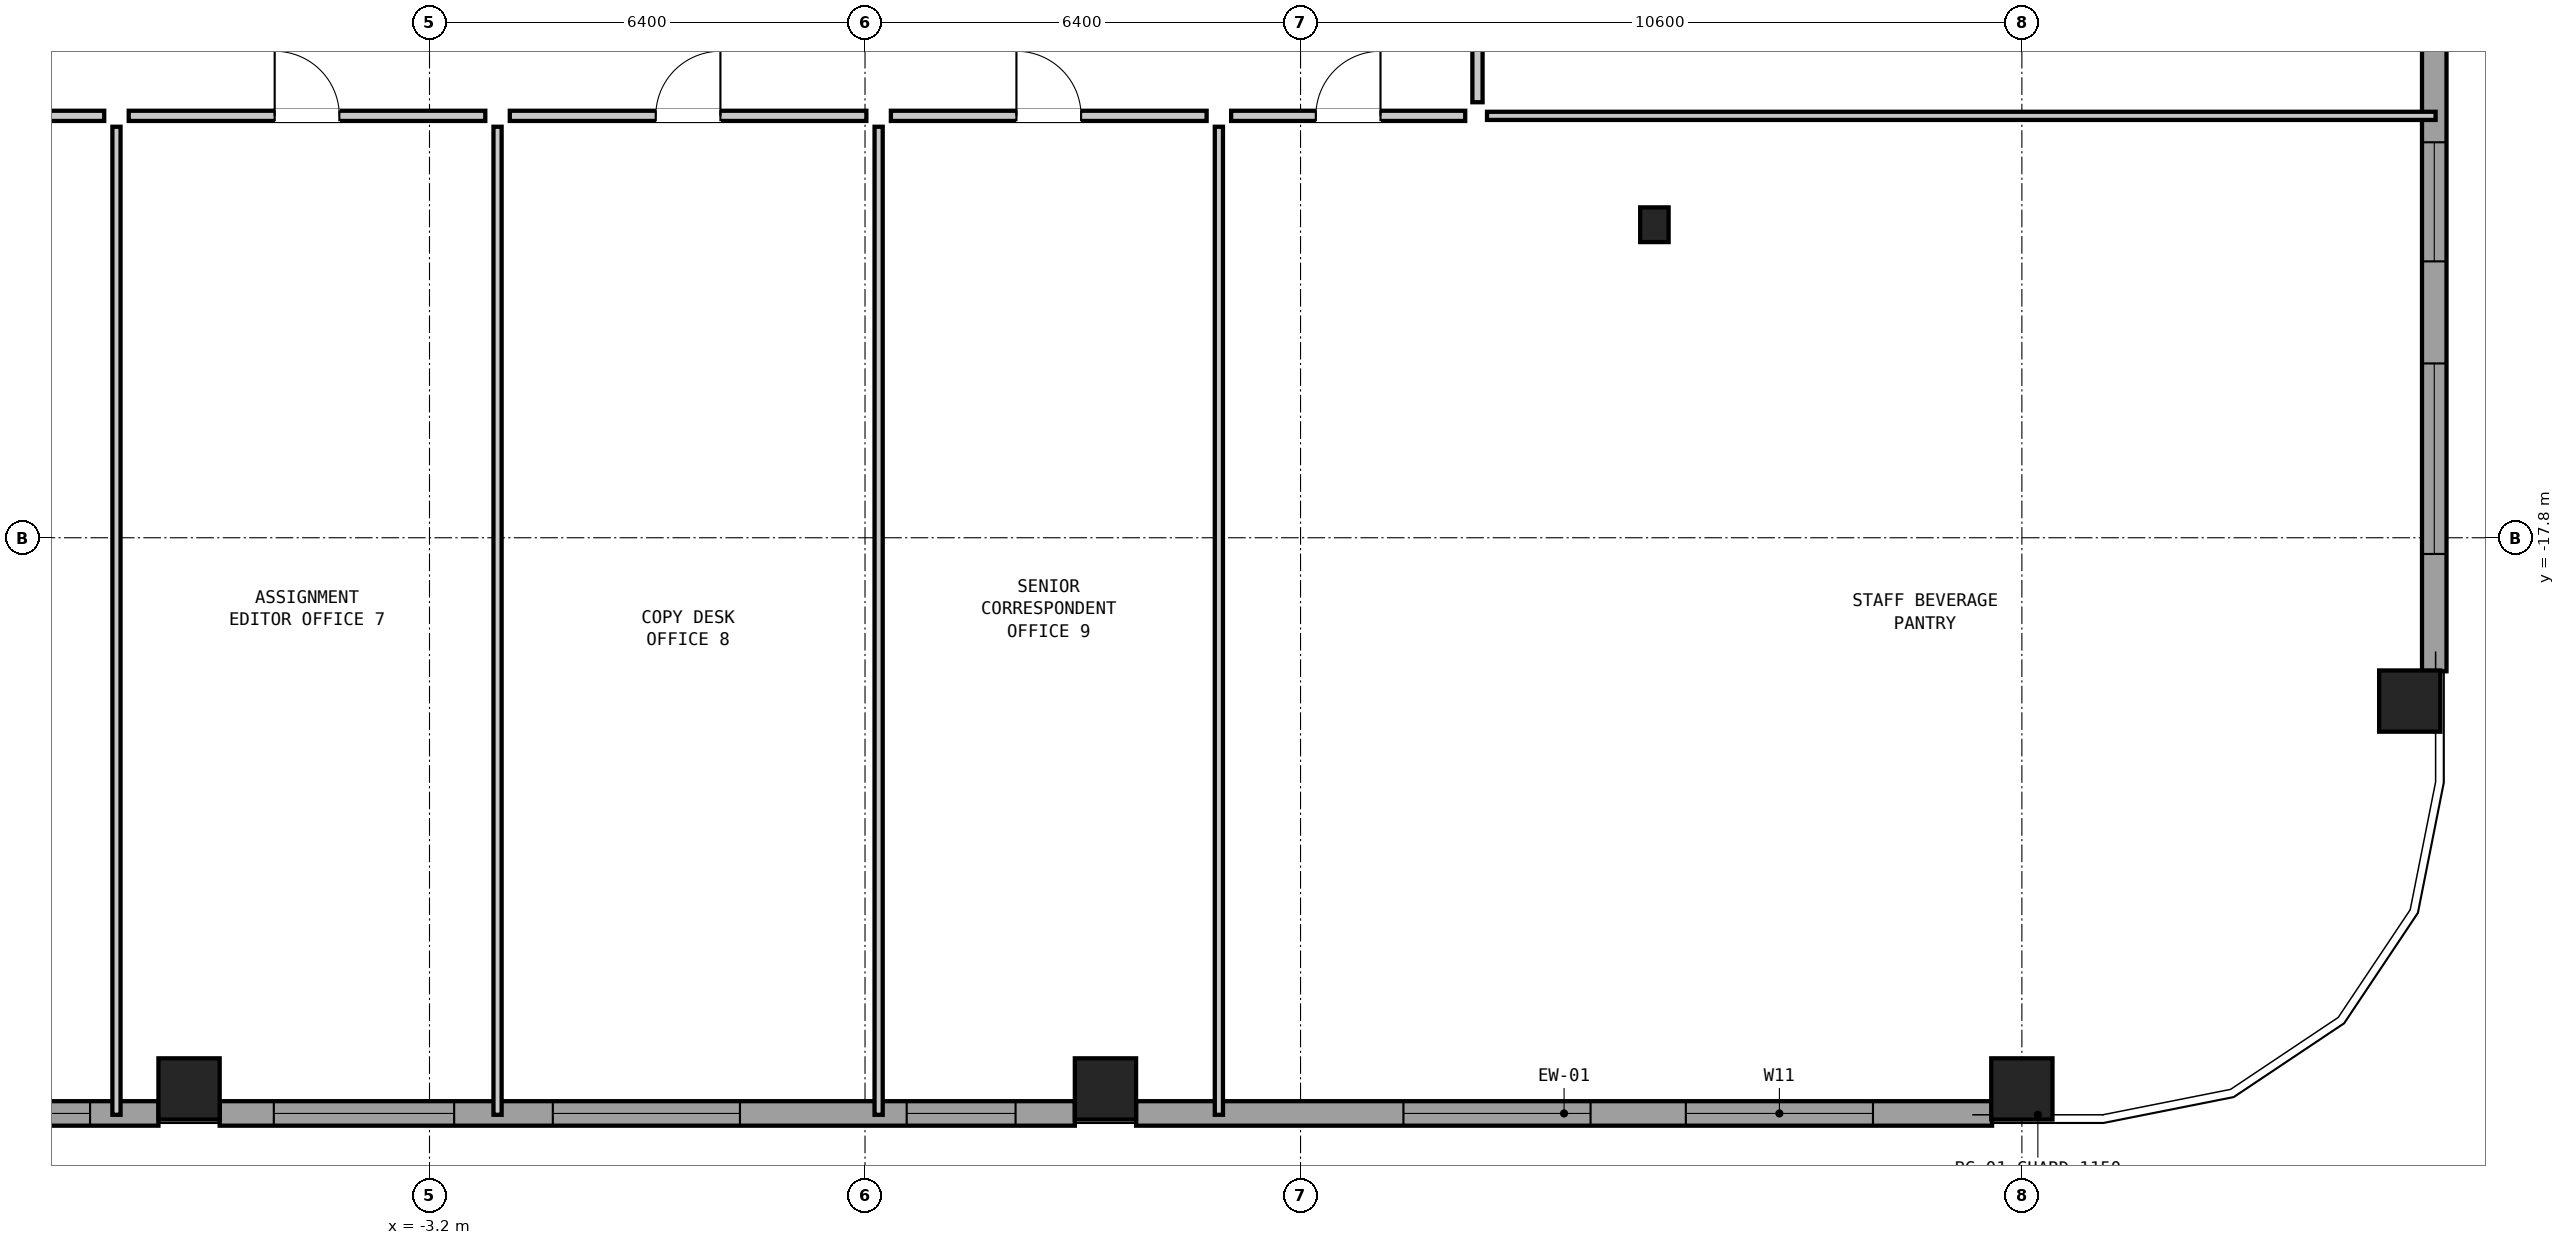
"""IFC4 building model, lengths in metres.
Left out: names, types, materials, properties, quantities, classifications, styles, units other than length and angle.
Written with IfcOpenShell. Run it as: python <this file> out.ifc"""

import sys

from ifc_helpers import new_model, si_unit, direction, frame, frame_2d, origin, origin_2d, place, context, subcontext, project, spatial, rectangle, hollow_rectangle, i_section, extrude, element, fill, save


model = new_model("IFC4")
c1 = context("Model", 3, precision=1e-05, world=origin(), true_north=direction((0.0, 1.0)))
c2 = subcontext(c1, "Body", "Model", "MODEL_VIEW")
j1 = project(units=[si_unit("LENGTHUNIT", "METRE"), si_unit("PLANEANGLEUNIT", "RADIAN")], contexts=[c1])
p1 = place(None, origin())
s1 = spatial("IfcSite", under=j1, at=p1, CompositionType="ELEMENT")
p2 = place(p1, origin())
s2 = spatial("IfcBuilding", under=s1, at=p2, CompositionType="ELEMENT")
p3 = place(p2, frame((0.0, 0.0, 35.25)))
s3 = spatial("IfcBuildingStorey", under=s2, at=p3, CompositionType="ELEMENT", Elevation=35.25)
for number, where, z_axis, x_axis in (
    (1, (-6.733, -25.9, 0.0), (0.0, 0.0, 1.0), (1.0, 0.0, 0.0)),
    (2, (6.733, -25.9, 0.0), (0.0, 0.0, 1.0), (1.0, 0.0, 0.0)),
    (3, (20.2, -25.9, 0.0), (0.0, 0.0, 1.0), (1.0, 0.0, 0.0)),
    (4, (25.9, -20.2, 0.0), (0.0, 0.0, 1.0), (0.0, 1.0, 0.0)),
):
    element("IfcColumn", number, at=place(p3, frame(where, z_axis=z_axis, x_axis=x_axis)), inside=s3, PredefinedType="COLUMN", context=c2, shape_type="SweptSolid", body=[
        extrude(hollow_rectangle(XDim=0.9, YDim=0.9, WallThickness=0.055, at=origin_2d()), origin(), (0.0, 0.0, 1.0), 3.05),
    ])
p4 = place(p3, frame((14.8, -13.2, 0.0), z_axis=(0.0, 0.0, 1.0), x_axis=(1.0, 0.0, 0.0)))
e5 = element("IfcColumn", 5, at=p4, inside=s3, PredefinedType="COLUMN", context=c2, shape_type="SweptSolid", body=[
    extrude(i_section(OverallWidth=0.418, OverallDepth=0.51, WebThickness=0.042, FlangeThickness=0.068, at=origin_2d()), origin(), (0.0, 0.0, 1.0), 3.05),
])
p5 = place(p3, frame((19.762, -26.26, 0.0), z_axis=(0.0, 0.0, 1.0), x_axis=(-1.0, 0.0, 0.0)))
e6 = element("IfcWall", 6, at=p5, inside=s3, PredefinedType="SOLIDWALL", context=c2, shape_type="SweptSolid", body=[
    extrude(rectangle(XDim=12.579, YDim=0.36, at=frame_2d((6.289, 0.0))), origin(), (0.0, 0.0, 1.0), 2.067),
])
p6 = place(p5, frame((1.75, 0.0, 0.2)))
e7 = element("IfcOpeningElement", 7, at=p6, cuts=e6, PredefinedType="OPENING", context=c2, shape_type="SweptSolid", body=[
    extrude(rectangle(XDim=2.75, YDim=0.95, at=frame_2d((1.375, 0.475))), frame((0.0, 0.192, 0.0), z_axis=(0.0, -1.0, 0.0), x_axis=(1.0, 0.0, 0.0)), (0.0, 0.0, 1.0), 0.384),
])
p7 = place(p5, frame((5.9, 0.0, 0.95)))
e8 = element("IfcOpeningElement", 8, at=p7, cuts=e6, PredefinedType="OPENING", context=c2, shape_type="SweptSolid", body=[
    extrude(rectangle(XDim=2.75, YDim=0.95, at=frame_2d((1.375, 0.475))), frame((0.0, 0.192, 0.0), z_axis=(0.0, -1.0, 0.0), x_axis=(1.0, 0.0, 0.0)), (0.0, 0.0, 1.0), 0.384),
])
p8 = place(p3, frame((6.283, -26.26, 0.0), z_axis=(0.0, 0.0, 1.0), x_axis=(-1.0, 0.0, 0.0)))
e9 = element("IfcWall", 9, at=p8, inside=s3, PredefinedType="SOLIDWALL", context=c2, shape_type="SweptSolid", body=[
    extrude(rectangle(XDim=12.566, YDim=0.36, at=frame_2d((6.283, 0.0))), origin(), (0.0, 0.0, 1.0), 2.067),
])
p9 = place(p8, frame((0.871, 0.0, 0.85)))
e10 = element("IfcOpeningElement", 10, at=p9, cuts=e9, PredefinedType="OPENING", context=c2, shape_type="SweptSolid", body=[
    extrude(rectangle(XDim=1.6, YDim=1.05, at=frame_2d((0.8, 0.525))), frame((0.0, 0.192, 0.0), z_axis=(0.0, -1.0, 0.0), x_axis=(1.0, 0.0, 0.0)), (0.0, 0.0, 1.0), 0.384),
])
p10 = place(p8, frame((4.921, 0.0, 0.2)))
e11 = element("IfcOpeningElement", 11, at=p10, cuts=e9, PredefinedType="OPENING", context=c2, shape_type="SweptSolid", body=[
    extrude(rectangle(XDim=2.75, YDim=0.95, at=frame_2d((1.375, 0.475))), frame((0.0, 0.192, 0.0), z_axis=(0.0, -1.0, 0.0), x_axis=(1.0, 0.0, 0.0)), (0.0, 0.0, 1.0), 0.384),
])
p11 = place(p8, frame((9.121, 0.0, 0.9)))
e12 = element("IfcOpeningElement", 12, at=p11, cuts=e9, PredefinedType="OPENING", context=c2, shape_type="SweptSolid", body=[
    extrude(rectangle(XDim=2.65, YDim=1.0, at=frame_2d((1.325, 0.5))), frame((0.0, 0.192, 0.0), z_axis=(0.0, -1.0, 0.0), x_axis=(1.0, 0.0, 0.0)), (0.0, 0.0, 1.0), 0.384),
])
p12 = place(p3, frame((-7.183, -26.26, 0.0), z_axis=(0.0, 0.0, 1.0), x_axis=(-1.0, 0.0, 0.0)))
e13 = element("IfcWall", 13, at=p12, inside=s3, PredefinedType="SOLIDWALL", context=c2, shape_type="SweptSolid", body=[
    extrude(rectangle(XDim=12.579, YDim=0.36, at=frame_2d((6.289, 0.0))), origin(), (0.0, 0.0, 1.0), 2.067),
])
p13 = place(p12, frame((1.005, 0.0, 0.2)))
e14 = element("IfcOpeningElement", 14, at=p13, cuts=e13, PredefinedType="OPENING", context=c2, shape_type="SweptSolid", body=[
    extrude(rectangle(XDim=1.5, YDim=0.95, at=frame_2d((0.75, 0.475))), frame((0.0, 0.192, 0.0), z_axis=(0.0, -1.0, 0.0), x_axis=(1.0, 0.0, 0.0)), (0.0, 0.0, 1.0), 0.384),
])
p14 = place(p12, frame((3.905, 0.0, 0.95)))
e15 = element("IfcOpeningElement", 15, at=p14, cuts=e13, PredefinedType="OPENING", context=c2, shape_type="SweptSolid", body=[
    extrude(rectangle(XDim=2.75, YDim=0.95, at=frame_2d((1.375, 0.475))), frame((0.0, 0.192, 0.0), z_axis=(0.0, -1.0, 0.0), x_axis=(1.0, 0.0, 0.0)), (0.0, 0.0, 1.0), 0.384),
])
p15 = place(p12, frame((8.005, 0.0, 0.2)))
e16 = element("IfcOpeningElement", 16, at=p15, cuts=e13, PredefinedType="OPENING", context=c2, shape_type="SweptSolid", body=[
    extrude(rectangle(XDim=2.9, YDim=0.9, at=frame_2d((1.45, 0.45))), frame((0.0, 0.192, 0.0), z_axis=(0.0, -1.0, 0.0), x_axis=(1.0, 0.0, 0.0)), (0.0, 0.0, 1.0), 0.384),
])
p16 = place(p3, frame((26.26, -7.183, 0.0), z_axis=(0.0, 0.0, 1.0), x_axis=(0.0, -1.0, 0.0)))
e17 = element("IfcWall", 17, at=p16, inside=s3, PredefinedType="SOLIDWALL", context=c2, shape_type="SweptSolid", body=[
    extrude(rectangle(XDim=12.579, YDim=0.36, at=frame_2d((6.289, 0.0))), origin(), (0.0, 0.0, 1.0), 2.067),
])
p17 = place(p16, frame((0.055, 0.0, 0.2)))
e18 = element("IfcOpeningElement", 18, at=p17, cuts=e17, PredefinedType="OPENING", context=c2, shape_type="SweptSolid", body=[
    extrude(rectangle(XDim=2.25, YDim=1.15, at=frame_2d((1.125, 0.575))), frame((0.0, 0.192, 0.0), z_axis=(0.0, -1.0, 0.0), x_axis=(1.0, 0.0, 0.0)), (0.0, 0.0, 1.0), 0.384),
])
p18 = place(p16, frame((4.805, 0.0, 0.8)))
e19 = element("IfcOpeningElement", 19, at=p18, cuts=e17, PredefinedType="OPENING", context=c2, shape_type="SweptSolid", body=[
    extrude(rectangle(XDim=1.75, YDim=1.1, at=frame_2d((0.875, 0.55))), frame((0.0, 0.192, 0.0), z_axis=(0.0, -1.0, 0.0), x_axis=(1.0, 0.0, 0.0)), (0.0, 0.0, 1.0), 0.384),
])
p19 = place(p16, frame((8.055, 0.0, 0.2)))
e20 = element("IfcOpeningElement", 20, at=p19, cuts=e17, PredefinedType="OPENING", context=c2, shape_type="SweptSolid", body=[
    extrude(rectangle(XDim=2.8, YDim=1.0, at=frame_2d((1.4, 0.5))), frame((0.0, 0.192, 0.0), z_axis=(0.0, -1.0, 0.0), x_axis=(1.0, 0.0, 0.0)), (0.0, 0.0, 1.0), 0.384),
])
p20 = place(p3, frame((12.34, -11.6, 0.0), z_axis=(0.0, 0.0, 1.0), x_axis=(1.0, 0.0, 0.0)))
e21 = element("IfcWall", 21, at=p20, inside=s3, PredefinedType="PARTITIONING", context=c2, shape_type="SweptSolid", body=[
    extrude(rectangle(XDim=13.94, YDim=0.12, at=frame_2d((6.97, 0.0))), origin(), (0.0, 0.0, 1.0), 2.274),
])
for number, where, z_axis, x_axis in (
    (22, (-7.8, -26.28, 0.0), (0.0, 0.0, 1.0), (0.0, 1.0, 0.0)),
    (23, (-2.2, -26.28, 0.0), (0.0, 0.0, 1.0), (0.0, 1.0, 0.0)),
):
    element("IfcWall", number, at=place(p3, frame(where, z_axis=z_axis, x_axis=x_axis)), inside=s3, PredefinedType="PARTITIONING", context=c2, shape_type="SweptSolid", body=[
        extrude(rectangle(XDim=14.52, YDim=0.12, at=frame_2d((7.26, 0.0))), origin(), (0.0, 0.0, 1.0), 2.83),
    ])
p21 = place(p3, frame((3.4, -26.28, 0.0), z_axis=(0.0, 0.0, 1.0), x_axis=(0.0, 1.0, 0.0)))
e24 = element("IfcWall", 24, at=p21, inside=s3, PredefinedType="PARTITIONING", context=c2, shape_type="SweptSolid", body=[
    extrude(rectangle(XDim=14.52, YDim=0.12, at=frame_2d((7.26, 0.0))), origin(), (0.0, 0.0, 1.0), 2.274),
])
p22 = place(p3, frame((8.4, -26.28, 0.0), z_axis=(0.0, 0.0, 1.0), x_axis=(0.0, 1.0, 0.0)))
e25 = element("IfcWall", 25, at=p22, inside=s3, PredefinedType="PARTITIONING", context=c2, shape_type="SweptSolid", body=[
    extrude(rectangle(XDim=14.52, YDim=0.12, at=frame_2d((7.26, 0.0))), origin(), (0.0, 0.0, 1.0), 2.83),
])
p23 = place(p3, frame((-12.02, -11.6, 0.0), z_axis=(0.0, 0.0, 1.0), x_axis=(1.0, 0.0, 0.0)))
e26 = element("IfcWall", 26, at=p23, inside=s3, PredefinedType="PARTITIONING", context=c2, shape_type="SweptSolid", body=[
    extrude(rectangle(XDim=4.04, YDim=0.15, at=frame_2d((2.02, 0.0))), origin(), (0.0, 0.0, 1.0), 2.274),
])
p24 = place(p23, frame((1.345, 0.0, 0.0)))
e27 = element("IfcOpeningElement", 27, at=p24, cuts=e26, PredefinedType="OPENING", context=c2, shape_type="SweptSolid", body=[
    extrude(rectangle(XDim=0.95, YDim=2.1, at=frame_2d((0.475, 1.05))), frame((0.0, 0.087, 0.0), z_axis=(0.0, -1.0, 0.0), x_axis=(1.0, 0.0, 0.0)), (0.0, 0.0, 1.0), 0.174),
])
p25 = place(p3, frame((-7.62, -11.6, 0.0), z_axis=(0.0, 0.0, 1.0), x_axis=(1.0, 0.0, 0.0)))
e28 = element("IfcWall", 28, at=p25, inside=s3, PredefinedType="PARTITIONING", context=c2, shape_type="SweptSolid", body=[
    extrude(rectangle(XDim=5.24, YDim=0.15, at=frame_2d((2.62, 0.0))), origin(), (0.0, 0.0, 1.0), 2.83),
])
p26 = place(p25, frame((2.145, 0.0, 0.0)))
e29 = element("IfcOpeningElement", 29, at=p26, cuts=e28, PredefinedType="OPENING", context=c2, shape_type="SweptSolid", body=[
    extrude(rectangle(XDim=0.95, YDim=2.1, at=frame_2d((0.475, 1.05))), frame((0.0, 0.087, 0.0), z_axis=(0.0, -1.0, 0.0), x_axis=(1.0, 0.0, 0.0)), (0.0, 0.0, 1.0), 0.174),
])
p27 = place(p3, frame((-2.02, -11.6, 0.0), z_axis=(0.0, 0.0, 1.0), x_axis=(1.0, 0.0, 0.0)))
e30 = element("IfcWall", 30, at=p27, inside=s3, PredefinedType="PARTITIONING", context=c2, shape_type="SweptSolid", body=[
    extrude(rectangle(XDim=5.24, YDim=0.15, at=frame_2d((2.62, 0.0))), origin(), (0.0, 0.0, 1.0), 2.83),
])
p28 = place(p27, frame((2.145, 0.0, 0.0)))
e31 = element("IfcOpeningElement", 31, at=p28, cuts=e30, PredefinedType="OPENING", context=c2, shape_type="SweptSolid", body=[
    extrude(rectangle(XDim=0.95, YDim=2.1, at=frame_2d((0.475, 1.05))), frame((0.0, 0.087, 0.0), z_axis=(0.0, -1.0, 0.0), x_axis=(1.0, 0.0, 0.0)), (0.0, 0.0, 1.0), 0.174),
])
p29 = place(p3, frame((3.58, -11.6, 0.0), z_axis=(0.0, 0.0, 1.0), x_axis=(1.0, 0.0, 0.0)))
e32 = element("IfcWall", 32, at=p29, inside=s3, PredefinedType="PARTITIONING", context=c2, shape_type="SweptSolid", body=[
    extrude(rectangle(XDim=4.64, YDim=0.15, at=frame_2d((2.32, 0.0))), origin(), (0.0, 0.0, 1.0), 2.83),
])
p30 = place(p29, frame((1.845, 0.0, 0.0)))
e33 = element("IfcOpeningElement", 33, at=p30, cuts=e32, PredefinedType="OPENING", context=c2, shape_type="SweptSolid", body=[
    extrude(rectangle(XDim=0.95, YDim=2.1, at=frame_2d((0.475, 1.05))), frame((0.0, 0.087, 0.0), z_axis=(0.0, -1.0, 0.0), x_axis=(1.0, 0.0, 0.0)), (0.0, 0.0, 1.0), 0.174),
])
p31 = place(p3, frame((8.58, -11.6, 0.0), z_axis=(0.0, 0.0, 1.0), x_axis=(1.0, 0.0, 0.0)))
e34 = element("IfcWall", 34, at=p31, inside=s3, PredefinedType="PARTITIONING", context=c2, shape_type="SweptSolid", body=[
    extrude(rectangle(XDim=3.44, YDim=0.15, at=frame_2d((1.72, 0.0))), origin(), (0.0, 0.0, 1.0), 2.274),
])
p32 = place(p31, frame((1.245, 0.0, 0.0)))
e35 = element("IfcOpeningElement", 35, at=p32, cuts=e34, PredefinedType="OPENING", context=c2, shape_type="SweptSolid", body=[
    extrude(rectangle(XDim=0.95, YDim=2.1, at=frame_2d((0.475, 1.05))), frame((0.0, 0.087, 0.0), z_axis=(0.0, -1.0, 0.0), x_axis=(1.0, 0.0, 0.0)), (0.0, 0.0, 1.0), 0.174),
])
p33 = place(p3, frame((12.2, -11.4, 0.0), z_axis=(0.0, 0.0, 1.0), x_axis=(0.0, 1.0, 0.0)))
e36 = element("IfcWall", 36, at=p33, inside=s3, PredefinedType="PARTITIONING", context=c2, shape_type="SweptSolid", body=[
    extrude(rectangle(XDim=8.84, YDim=0.15, at=frame_2d((4.42, 0.0))), origin(), (0.0, 0.0, 1.0), 2.83),
])
p34 = place(p33, frame((3.945, 0.0, 0.0)))
e37 = element("IfcOpeningElement", 37, at=p34, cuts=e36, PredefinedType="OPENING", context=c2, shape_type="SweptSolid", body=[
    extrude(rectangle(XDim=0.95, YDim=2.1, at=frame_2d((0.475, 1.05))), frame((0.0, 0.087, 0.0), z_axis=(0.0, -1.0, 0.0), x_axis=(1.0, 0.0, 0.0)), (0.0, 0.0, 1.0), 0.174),
])
p35 = place(p6, origin())
e38 = element("IfcWindow", 38, at=p35, inside=s3, PartitioningType="SINGLE_PANEL", PredefinedType="WINDOW", context=c2, shape_type="SweptSolid", body=[
    extrude(rectangle(XDim=2.75, YDim=0.95, at=frame_2d((1.375, 0.475))), frame((0.0, 0.03, 0.0), z_axis=(0.0, -1.0, 0.0), x_axis=(1.0, 0.0, 0.0)), (0.0, 0.0, 1.0), 0.06),
])
fill(e7, e38)
p36 = place(p7, origin())
e39 = element("IfcWindow", 39, at=p36, inside=s3, PartitioningType="SINGLE_PANEL", PredefinedType="WINDOW", context=c2, shape_type="SweptSolid", body=[
    extrude(rectangle(XDim=2.75, YDim=0.95, at=frame_2d((1.375, 0.475))), frame((0.0, 0.03, 0.0), z_axis=(0.0, -1.0, 0.0), x_axis=(1.0, 0.0, 0.0)), (0.0, 0.0, 1.0), 0.06),
])
fill(e8, e39)
p37 = place(p9, origin())
e40 = element("IfcWindow", 40, at=p37, inside=s3, PartitioningType="SINGLE_PANEL", PredefinedType="WINDOW", context=c2, shape_type="SweptSolid", body=[
    extrude(rectangle(XDim=1.6, YDim=1.05, at=frame_2d((0.8, 0.525))), frame((0.0, 0.03, 0.0), z_axis=(0.0, -1.0, 0.0), x_axis=(1.0, 0.0, 0.0)), (0.0, 0.0, 1.0), 0.06),
])
fill(e10, e40)
p38 = place(p10, origin())
e41 = element("IfcWindow", 41, at=p38, inside=s3, PartitioningType="SINGLE_PANEL", PredefinedType="WINDOW", context=c2, shape_type="SweptSolid", body=[
    extrude(rectangle(XDim=2.75, YDim=0.95, at=frame_2d((1.375, 0.475))), frame((0.0, 0.03, 0.0), z_axis=(0.0, -1.0, 0.0), x_axis=(1.0, 0.0, 0.0)), (0.0, 0.0, 1.0), 0.06),
])
fill(e11, e41)
p39 = place(p11, origin())
e42 = element("IfcWindow", 42, at=p39, inside=s3, PartitioningType="SINGLE_PANEL", PredefinedType="WINDOW", context=c2, shape_type="SweptSolid", body=[
    extrude(rectangle(XDim=2.65, YDim=1.0, at=frame_2d((1.325, 0.5))), frame((0.0, 0.03, 0.0), z_axis=(0.0, -1.0, 0.0), x_axis=(1.0, 0.0, 0.0)), (0.0, 0.0, 1.0), 0.06),
])
fill(e12, e42)
p40 = place(p13, origin())
e43 = element("IfcWindow", 43, at=p40, inside=s3, PartitioningType="SINGLE_PANEL", PredefinedType="WINDOW", context=c2, shape_type="SweptSolid", body=[
    extrude(rectangle(XDim=1.5, YDim=0.95, at=frame_2d((0.75, 0.475))), frame((0.0, 0.03, 0.0), z_axis=(0.0, -1.0, 0.0), x_axis=(1.0, 0.0, 0.0)), (0.0, 0.0, 1.0), 0.06),
])
fill(e14, e43)
p41 = place(p18, origin())
e44 = element("IfcWindow", 44, at=p41, inside=s3, PartitioningType="SINGLE_PANEL", PredefinedType="WINDOW", context=c2, shape_type="SweptSolid", body=[
    extrude(rectangle(XDim=1.75, YDim=1.1, at=frame_2d((0.875, 0.55))), frame((0.0, 0.03, 0.0), z_axis=(0.0, -1.0, 0.0), x_axis=(1.0, 0.0, 0.0)), (0.0, 0.0, 1.0), 0.06),
])
fill(e19, e44)
p42 = place(p19, origin())
e45 = element("IfcWindow", 45, at=p42, inside=s3, PartitioningType="SINGLE_PANEL", PredefinedType="WINDOW", context=c2, shape_type="SweptSolid", body=[
    extrude(rectangle(XDim=2.8, YDim=1.0, at=frame_2d((1.4, 0.5))), frame((0.0, 0.03, 0.0), z_axis=(0.0, -1.0, 0.0), x_axis=(1.0, 0.0, 0.0)), (0.0, 0.0, 1.0), 0.06),
])
fill(e20, e45)
p43 = place(p26, origin())
e46 = element("IfcDoor", 46, at=p43, inside=s3, OperationType="SINGLE_SWING_LEFT", PredefinedType="DOOR", context=c2, shape_type="SweptSolid", body=[
    extrude(rectangle(XDim=0.95, YDim=2.1, at=frame_2d((0.475, 1.05))), frame((0.0, 0.025, 0.0), z_axis=(0.0, -1.0, 0.0), x_axis=(1.0, 0.0, 0.0)), (0.0, 0.0, 1.0), 0.05),
])
fill(e29, e46)
p44 = place(p28, origin())
e47 = element("IfcDoor", 47, at=p44, inside=s3, OperationType="SINGLE_SWING_RIGHT", PredefinedType="DOOR", context=c2, shape_type="SweptSolid", body=[
    extrude(rectangle(XDim=0.95, YDim=2.1, at=frame_2d((0.475, 1.05))), frame((0.0, 0.025, 0.0), z_axis=(0.0, -1.0, 0.0), x_axis=(1.0, 0.0, 0.0)), (0.0, 0.0, 1.0), 0.05),
])
fill(e31, e47)
p45 = place(p30, origin())
e48 = element("IfcDoor", 48, at=p45, inside=s3, OperationType="SINGLE_SWING_LEFT", PredefinedType="DOOR", context=c2, shape_type="SweptSolid", body=[
    extrude(rectangle(XDim=0.95, YDim=2.1, at=frame_2d((0.475, 1.05))), frame((0.0, 0.025, 0.0), z_axis=(0.0, -1.0, 0.0), x_axis=(1.0, 0.0, 0.0)), (0.0, 0.0, 1.0), 0.05),
])
fill(e33, e48)
p46 = place(p32, origin())
e49 = element("IfcDoor", 49, at=p46, inside=s3, OperationType="SINGLE_SWING_RIGHT", PredefinedType="DOOR", context=c2, shape_type="SweptSolid", body=[
    extrude(rectangle(XDim=0.95, YDim=2.1, at=frame_2d((0.475, 1.05))), frame((0.0, 0.025, 0.0), z_axis=(0.0, -1.0, 0.0), x_axis=(1.0, 0.0, 0.0)), (0.0, 0.0, 1.0), 0.05),
])
fill(e35, e49)
save(model, sys.argv[1])
